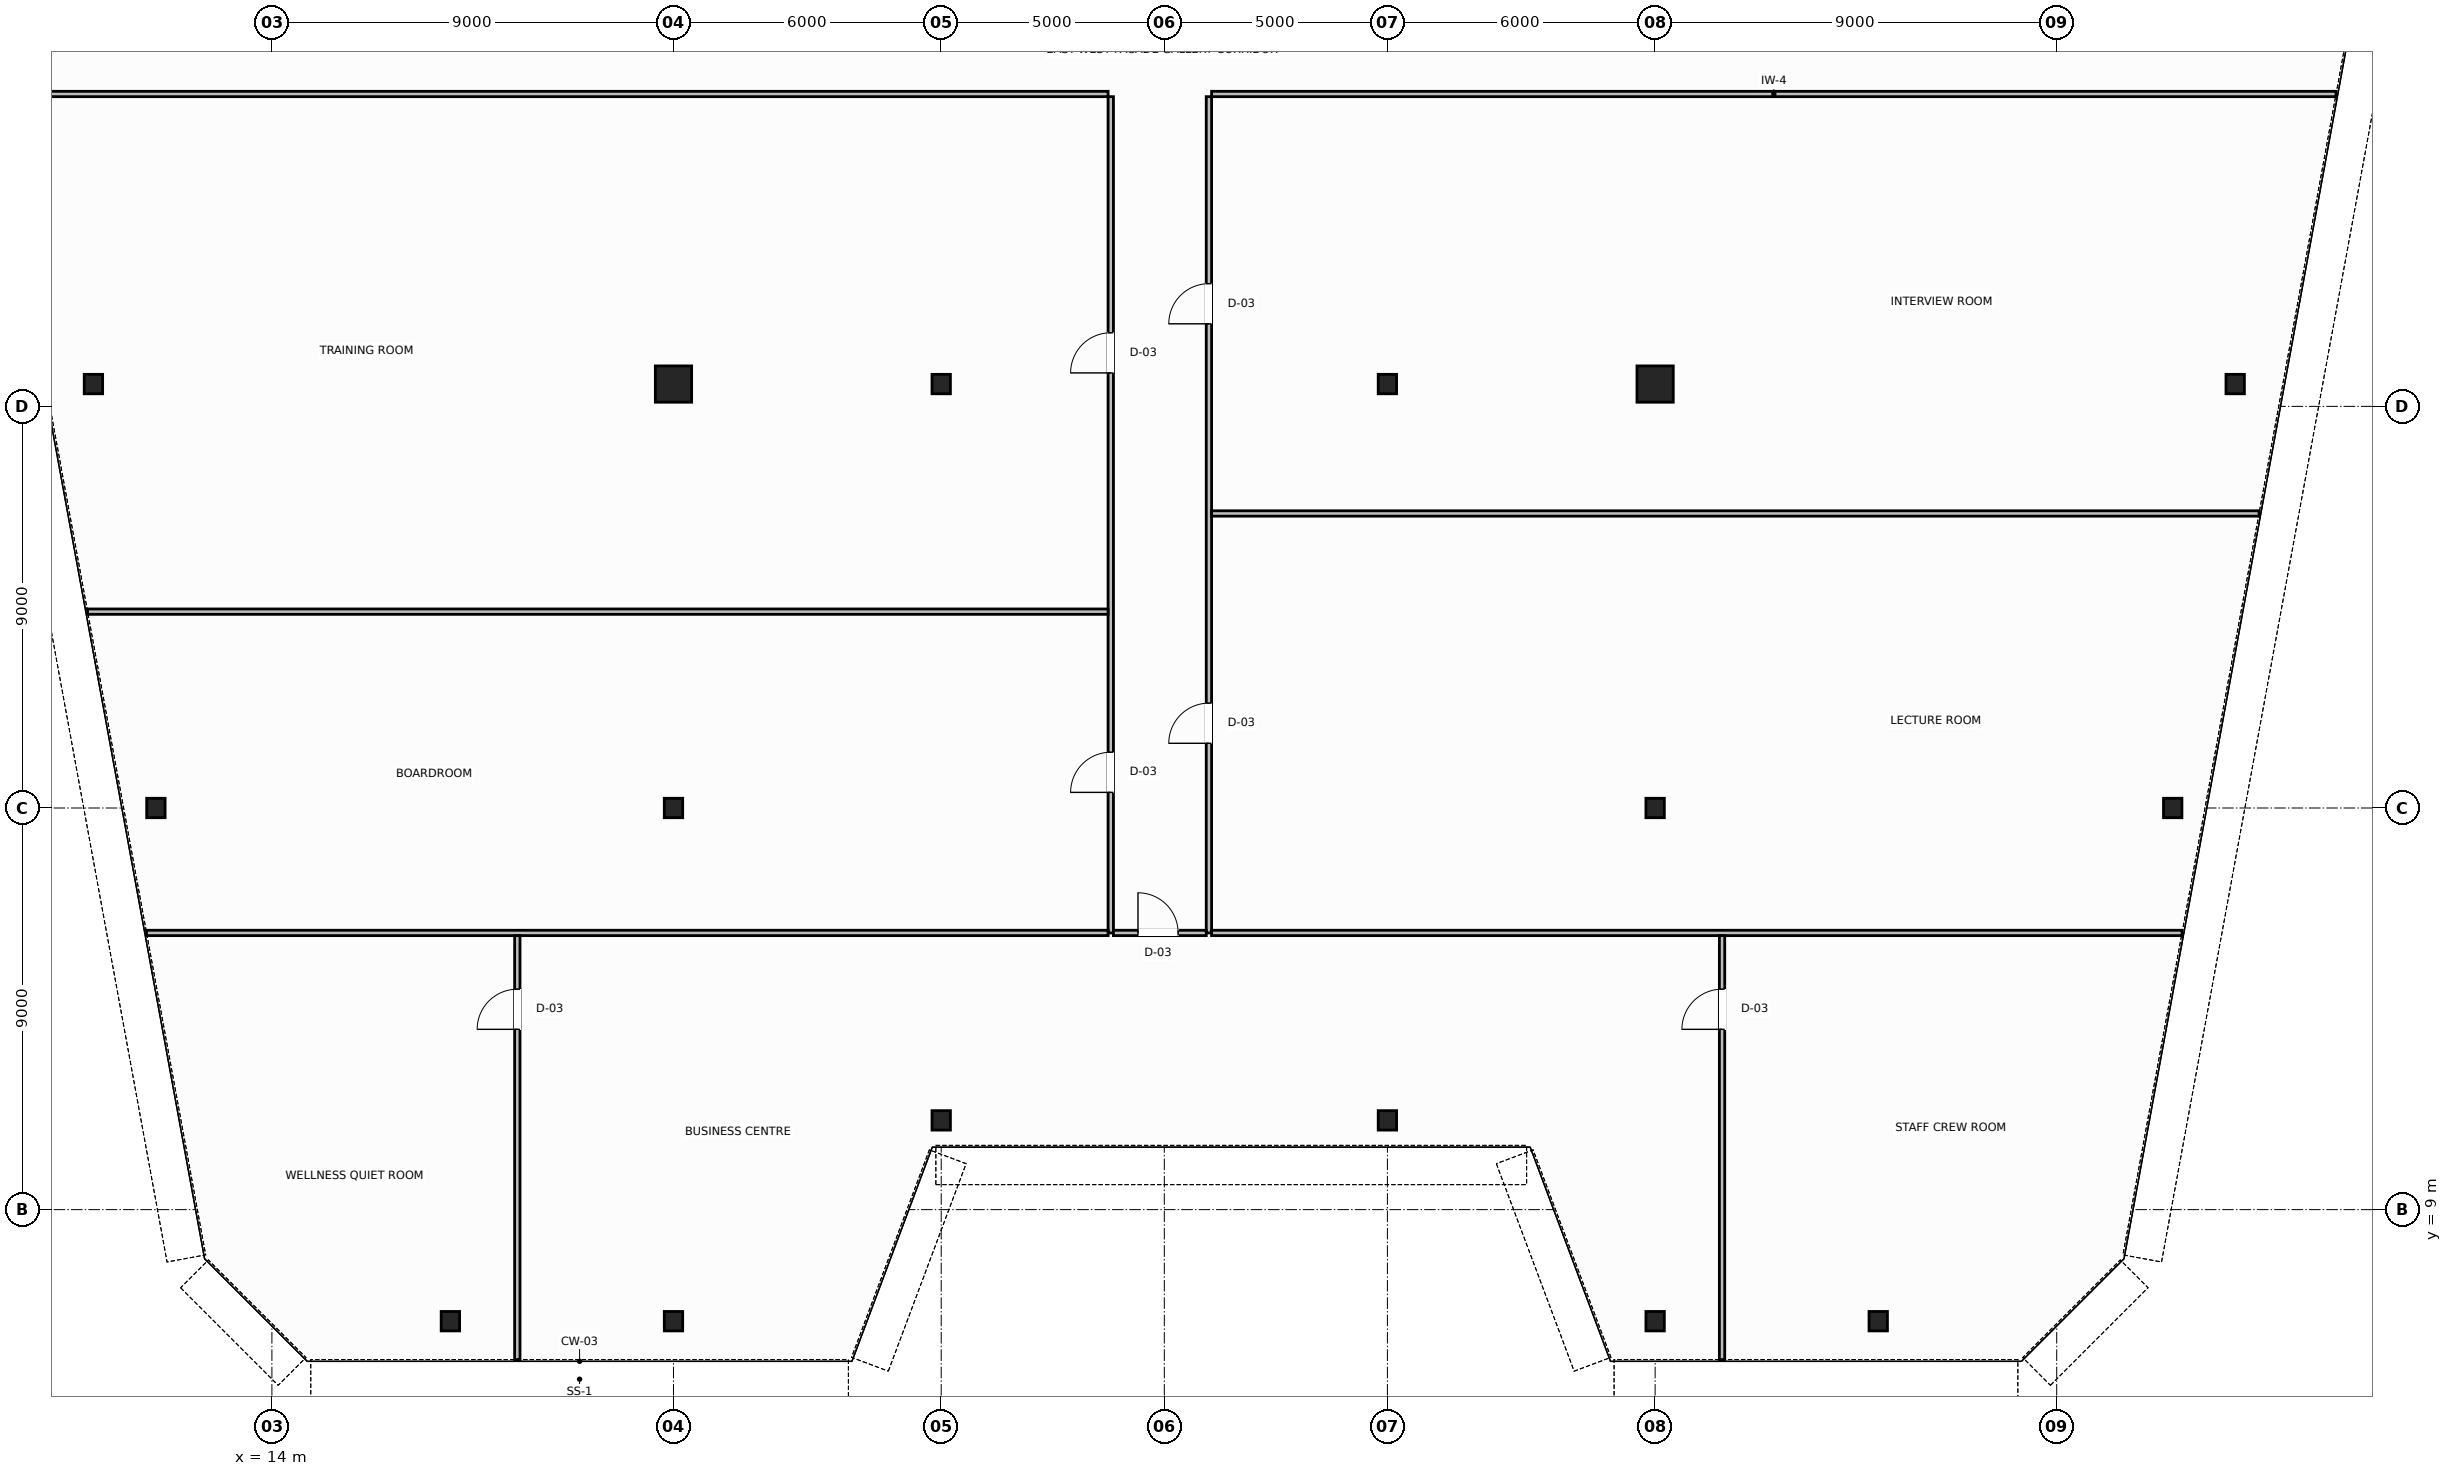
"""IFC4 building model, lengths in metres.
Left out: names, types, materials, properties, quantities, classifications, styles, units other than length and angle.
Written with IfcOpenShell. Run it as: python <this file> out.ifc"""

import sys

from ifc_helpers import new_model, si_unit, direction, frame, frame_2d, origin, origin_2d, place, context, subcontext, project, spatial, rectangle, hollow_circle, i_section, extrude, source, transform, mapped, element, fill, save


model = new_model("IFC4")
c1 = context("Model", 3, precision=1e-05, world=origin(), true_north=direction((0.0, 1.0)))
c2 = subcontext(c1, "Body", "Model", "MODEL_VIEW")
j1 = project(units=[si_unit("LENGTHUNIT", "METRE"), si_unit("PLANEANGLEUNIT", "RADIAN")], contexts=[c1])
p1 = place(None, origin())
s1 = spatial("IfcSite", under=j1, at=p1, CompositionType="ELEMENT")
p2 = place(p1, origin())
s2 = spatial("IfcBuilding", under=s1, at=p2, CompositionType="ELEMENT")
p3 = place(p2, frame((0.0, 0.0, 191.8)))
s3 = spatial("IfcBuildingStorey", under=s2, at=p3, CompositionType="ELEMENT", Elevation=191.8)
m1 = source(origin(), c2, "Body", "SweptSolid", [
    extrude(i_section(OverallWidth=0.412, OverallDepth=0.435, WebThickness=0.036, FlangeThickness=0.05, FilletRadius=0.015, at=origin_2d()), origin(), (0.0, 0.0, 1.0), 3.8),
])
for number, where, z_axis, x_axis in (
    (1, (10.0, 27.5, 0.0), (0.0, 0.0, 1.0), (1.0, 0.0, 0.0)),
    (2, (11.4, 18.0, 0.0), (0.0, 0.0, 1.0), (1.0, 0.0, 0.0)),
    (3, (58.0, 27.5, 0.0), (0.0, 0.0, 1.0), (1.0, 0.0, 0.0)),
    (4, (56.6, 18.0, 0.0), (0.0, 0.0, 1.0), (1.0, 0.0, 0.0)),
):
    element("IfcColumn", number, at=place(p3, frame(where, z_axis=z_axis, x_axis=x_axis)), inside=s3, PredefinedType="COLUMN", context=c2, shape_type="MappedRepresentation", body=[
        mapped(m1, transform((0.0, 0.0, 0.0), scale=1.0)),
    ])
m2 = source(origin(), c2, "Body", "SweptSolid", [
    extrude(hollow_circle(Radius=0.406, WallThickness=0.04, at=origin_2d()), origin(), (0.0, 0.0, 1.0), 3.8),
])
p4 = place(p3, frame((23.0, 27.5, 0.0), z_axis=(0.0, 0.0, 1.0), x_axis=(1.0, 0.0, 0.0)))
e5 = element("IfcColumn", 5, at=p4, inside=s3, PredefinedType="COLUMN", context=c2, shape_type="MappedRepresentation", body=[
    mapped(m2, transform((0.0, 0.0, 0.0), scale=1.0)),
])
m3 = source(origin(), c2, "Body", "SweptSolid", [
    extrude(i_section(OverallWidth=0.412, OverallDepth=0.435, WebThickness=0.036, FlangeThickness=0.05, FilletRadius=0.015, at=origin_2d()), origin(), (0.0, 0.0, 1.0), 3.8),
])
for number, where, z_axis, x_axis in (
    (6, (29.0, 27.5, 0.0), (0.0, 0.0, 1.0), (1.0, 0.0, 0.0)),
    (7, (39.0, 27.5, 0.0), (0.0, 0.0, 1.0), (1.0, 0.0, 0.0)),
):
    element("IfcColumn", number, at=place(p3, frame(where, z_axis=z_axis, x_axis=x_axis)), inside=s3, PredefinedType="COLUMN", context=c2, shape_type="MappedRepresentation", body=[
        mapped(m3, transform((0.0, 0.0, 0.0), scale=1.0)),
    ])
p5 = place(p3, frame((45.0, 27.5, 0.0), z_axis=(0.0, 0.0, 1.0), x_axis=(1.0, 0.0, 0.0)))
e8 = element("IfcColumn", 8, at=p5, inside=s3, PredefinedType="COLUMN", context=c2, shape_type="MappedRepresentation", body=[
    mapped(m2, transform((0.0, 0.0, 0.0), scale=1.0)),
])
for number, where, z_axis, x_axis in (
    (9, (23.0, 18.0, 0.0), (0.0, 0.0, 1.0), (1.0, 0.0, 0.0)),
    (10, (45.0, 18.0, 0.0), (0.0, 0.0, 1.0), (1.0, 0.0, 0.0)),
    (11, (18.0, 6.5, 0.0), (0.0, 0.0, 1.0), (1.0, 0.0, 0.0)),
    (12, (23.0, 6.5, 0.0), (0.0, 0.0, 1.0), (1.0, 0.0, 0.0)),
    (13, (29.0, 11.0, 0.0), (0.0, 0.0, 1.0), (1.0, 0.0, 0.0)),
    (14, (39.0, 11.0, 0.0), (0.0, 0.0, 1.0), (1.0, 0.0, 0.0)),
    (15, (45.0, 6.5, 0.0), (0.0, 0.0, 1.0), (1.0, 0.0, 0.0)),
    (16, (50.0, 6.5, 0.0), (0.0, 0.0, 1.0), (1.0, 0.0, 0.0)),
):
    element("IfcColumn", number, at=place(p3, frame(where, z_axis=z_axis, x_axis=x_axis)), inside=s3, PredefinedType="COLUMN", context=c2, shape_type="MappedRepresentation", body=[
        mapped(m3, transform((0.0, 0.0, 0.0), scale=1.0)),
    ])
p6 = place(p3, frame((7.739, 34.0, 0.0), z_axis=(0.0, 0.0, 1.0), x_axis=(1.0, 0.0, 0.0)))
e17 = element("IfcWall", 17, at=p6, inside=s3, PredefinedType="PARTITIONING", context=c2, shape_type="SweptSolid", body=[
    extrude(rectangle(XDim=25.001, YDim=0.12, at=frame_2d((12.5, 0.0))), origin(), (0.0, 0.0, 1.0), 3.58),
])
p7 = place(p3, frame((35.06, 34.0, 0.0), z_axis=(0.0, 0.0, 1.0), x_axis=(1.0, 0.0, 0.0)))
e18 = element("IfcWall", 18, at=p7, inside=s3, PredefinedType="PARTITIONING", context=c2, shape_type="SweptSolid", body=[
    extrude(rectangle(XDim=25.201, YDim=0.12, at=frame_2d((12.601, 0.0))), origin(), (0.0, 0.0, 1.0), 3.58),
])
p8 = place(p3, frame((32.8, 15.2, 0.0), z_axis=(0.0, 0.0, 1.0), x_axis=(0.0, 1.0, 0.0)))
e19 = element("IfcWall", 19, at=p8, inside=s3, PredefinedType="PARTITIONING", context=c2, shape_type="SweptSolid", body=[
    extrude(rectangle(XDim=18.74, YDim=0.12, at=frame_2d((9.37, 0.0))), origin(), (0.0, 0.0, 1.0), 3.58),
])
p9 = place(p8, frame((3.15, 0.0, 0.0)))
e20 = element("IfcOpeningElement", 20, at=p9, cuts=e19, PredefinedType="OPENING", context=c2, shape_type="SweptSolid", body=[
    extrude(rectangle(XDim=0.9, YDim=2.15, at=frame_2d((0.45, 1.075))), frame((0.0, 0.07, 0.0), z_axis=(0.0, -1.0, 0.0), x_axis=(1.0, 0.0, 0.0)), (0.0, 0.0, 1.0), 0.14),
])
p10 = place(p8, frame((12.55, 0.0, 0.0)))
e21 = element("IfcOpeningElement", 21, at=p10, cuts=e19, PredefinedType="OPENING", context=c2, shape_type="SweptSolid", body=[
    extrude(rectangle(XDim=0.9, YDim=2.15, at=frame_2d((0.45, 1.075))), frame((0.0, 0.07, 0.0), z_axis=(0.0, -1.0, 0.0), x_axis=(1.0, 0.0, 0.0)), (0.0, 0.0, 1.0), 0.14),
])
p11 = place(p3, frame((35.0, 15.2, 0.0), z_axis=(0.0, 0.0, 1.0), x_axis=(0.0, 1.0, 0.0)))
e22 = element("IfcWall", 22, at=p11, inside=s3, PredefinedType="PARTITIONING", context=c2, shape_type="SweptSolid", body=[
    extrude(rectangle(XDim=18.74, YDim=0.12, at=frame_2d((9.37, 0.0))), origin(), (0.0, 0.0, 1.0), 3.58),
])
p12 = place(p11, frame((4.25, 0.0, 0.0)))
e23 = element("IfcOpeningElement", 23, at=p12, cuts=e22, PredefinedType="OPENING", context=c2, shape_type="SweptSolid", body=[
    extrude(rectangle(XDim=0.9, YDim=2.15, at=frame_2d((0.45, 1.075))), frame((0.0, 0.07, 0.0), z_axis=(0.0, -1.0, 0.0), x_axis=(1.0, 0.0, 0.0)), (0.0, 0.0, 1.0), 0.14),
])
p13 = place(p11, frame((13.65, 0.0, 0.0)))
e24 = element("IfcOpeningElement", 24, at=p13, cuts=e22, PredefinedType="OPENING", context=c2, shape_type="SweptSolid", body=[
    extrude(rectangle(XDim=0.9, YDim=2.15, at=frame_2d((0.45, 1.075))), frame((0.0, 0.07, 0.0), z_axis=(0.0, -1.0, 0.0), x_axis=(1.0, 0.0, 0.0)), (0.0, 0.0, 1.0), 0.14),
])
p14 = place(p3, frame((32.86, 15.2, 0.0), z_axis=(0.0, 0.0, 1.0), x_axis=(1.0, 0.0, 0.0)))
e25 = element("IfcWall", 25, at=p14, inside=s3, PredefinedType="PARTITIONING", context=c2, shape_type="SweptSolid", body=[
    extrude(rectangle(XDim=2.08, YDim=0.12, at=frame_2d((1.04, 0.0))), origin(), (0.0, 0.0, 1.0), 3.58),
])
p15 = place(p14, frame((0.55, 0.0, 0.0)))
e26 = element("IfcOpeningElement", 26, at=p15, cuts=e25, PredefinedType="OPENING", context=c2, shape_type="SweptSolid", body=[
    extrude(rectangle(XDim=0.9, YDim=2.15, at=frame_2d((0.45, 1.075))), frame((0.0, 0.07, 0.0), z_axis=(0.0, -1.0, 0.0), x_axis=(1.0, 0.0, 0.0)), (0.0, 0.0, 1.0), 0.14),
])
p16 = place(p3, frame((11.191, 15.2, 0.0), z_axis=(0.0, 0.0, 1.0), x_axis=(1.0, 0.0, 0.0)))
e27 = element("IfcWall", 27, at=p16, inside=s3, PredefinedType="PARTITIONING", context=c2, shape_type="SweptSolid", body=[
    extrude(rectangle(XDim=21.549, YDim=0.12, at=frame_2d((10.775, 0.0))), origin(), (0.0, 0.0, 1.0), 3.58),
])
p17 = place(p3, frame((35.06, 15.2, 0.0), z_axis=(0.0, 0.0, 1.0), x_axis=(1.0, 0.0, 0.0)))
e28 = element("IfcWall", 28, at=p17, inside=s3, PredefinedType="PARTITIONING", context=c2, shape_type="SweptSolid", body=[
    extrude(rectangle(XDim=21.749, YDim=0.12, at=frame_2d((10.875, 0.0))), origin(), (0.0, 0.0, 1.0), 3.58),
])
p18 = place(p3, frame((19.5, 5.64, 0.0), z_axis=(0.0, 0.0, 1.0), x_axis=(0.0, 1.0, 0.0)))
e29 = element("IfcWall", 29, at=p18, inside=s3, PredefinedType="PARTITIONING", context=c2, shape_type="SweptSolid", body=[
    extrude(rectangle(XDim=9.5, YDim=0.12, at=frame_2d((4.75, 0.0))), origin(), (0.0, 0.0, 1.0), 3.58),
])
p19 = place(p18, frame((7.4, 0.0, 0.0)))
e30 = element("IfcOpeningElement", 30, at=p19, cuts=e29, PredefinedType="OPENING", context=c2, shape_type="SweptSolid", body=[
    extrude(rectangle(XDim=0.9, YDim=2.15, at=frame_2d((0.45, 1.075))), frame((0.0, 0.07, 0.0), z_axis=(0.0, -1.0, 0.0), x_axis=(1.0, 0.0, 0.0)), (0.0, 0.0, 1.0), 0.14),
])
p20 = place(p3, frame((46.5, 5.64, 0.0), z_axis=(0.0, 0.0, 1.0), x_axis=(0.0, 1.0, 0.0)))
e31 = element("IfcWall", 31, at=p20, inside=s3, PredefinedType="PARTITIONING", context=c2, shape_type="SweptSolid", body=[
    extrude(rectangle(XDim=9.5, YDim=0.12, at=frame_2d((4.75, 0.0))), origin(), (0.0, 0.0, 1.0), 3.58),
])
p21 = place(p20, frame((7.4, 0.0, 0.0)))
e32 = element("IfcOpeningElement", 32, at=p21, cuts=e31, PredefinedType="OPENING", context=c2, shape_type="SweptSolid", body=[
    extrude(rectangle(XDim=0.9, YDim=2.15, at=frame_2d((0.45, 1.075))), frame((0.0, 0.07, 0.0), z_axis=(0.0, -1.0, 0.0), x_axis=(1.0, 0.0, 0.0)), (0.0, 0.0, 1.0), 0.14),
])
p22 = place(p3, frame((9.869, 22.4, 0.0), z_axis=(0.0, 0.0, 1.0), x_axis=(1.0, 0.0, 0.0)))
e33 = element("IfcWall", 33, at=p22, inside=s3, PredefinedType="PARTITIONING", context=c2, shape_type="SweptSolid", body=[
    extrude(rectangle(XDim=22.871, YDim=0.12, at=frame_2d((11.436, 0.0))), origin(), (0.0, 0.0, 1.0), 3.58),
])
p23 = place(p3, frame((35.06, 24.6, 0.0), z_axis=(0.0, 0.0, 1.0), x_axis=(1.0, 0.0, 0.0)))
e34 = element("IfcWall", 34, at=p23, inside=s3, PredefinedType="PARTITIONING", context=c2, shape_type="SweptSolid", body=[
    extrude(rectangle(XDim=23.475, YDim=0.12, at=frame_2d((11.738, 0.0))), origin(), (0.0, 0.0, 1.0), 3.58),
])
m4 = source(origin(), c2, "Body", "SweptSolid", [
    extrude(rectangle(XDim=0.9, YDim=2.15, at=frame_2d((0.45, 1.075))), frame((0.0, 0.025, 0.0), z_axis=(0.0, -1.0, 0.0), x_axis=(1.0, 0.0, 0.0)), (0.0, 0.0, 1.0), 0.05),
])
p24 = place(p19, origin())
e35 = element("IfcDoor", 35, at=p24, inside=s3, OperationType="SINGLE_SWING_RIGHT", PredefinedType="DOOR", context=c2, shape_type="MappedRepresentation", body=[
    mapped(m4, transform((0.0, 0.0, 0.0), scale=1.0)),
])
fill(e30, e35)
p25 = place(p15, origin())
e36 = element("IfcDoor", 36, at=p25, inside=s3, OperationType="SINGLE_SWING_LEFT", PredefinedType="DOOR", context=c2, shape_type="MappedRepresentation", body=[
    mapped(m4, transform((0.0, 0.0, 0.0), scale=1.0)),
])
fill(e26, e36)
p26 = place(p21, origin())
e37 = element("IfcDoor", 37, at=p26, inside=s3, OperationType="SINGLE_SWING_LEFT", PredefinedType="DOOR", context=c2, shape_type="MappedRepresentation", body=[
    mapped(m4, transform((0.0, 0.0, 0.0), scale=1.0)),
])
fill(e32, e37)
p27 = place(p9, origin())
e38 = element("IfcDoor", 38, at=p27, inside=s3, OperationType="SINGLE_SWING_LEFT", PredefinedType="DOOR", context=c2, shape_type="MappedRepresentation", body=[
    mapped(m4, transform((0.0, 0.0, 0.0), scale=1.0)),
])
fill(e20, e38)
p28 = place(p10, origin())
e39 = element("IfcDoor", 39, at=p28, inside=s3, OperationType="SINGLE_SWING_RIGHT", PredefinedType="DOOR", context=c2, shape_type="MappedRepresentation", body=[
    mapped(m4, transform((0.0, 0.0, 0.0), scale=1.0)),
])
fill(e21, e39)
p29 = place(p12, origin())
e40 = element("IfcDoor", 40, at=p29, inside=s3, OperationType="SINGLE_SWING_RIGHT", PredefinedType="DOOR", context=c2, shape_type="MappedRepresentation", body=[
    mapped(m4, transform((0.0, 0.0, 0.0), scale=1.0)),
])
fill(e23, e40)
p30 = place(p13, origin())
e41 = element("IfcDoor", 41, at=p30, inside=s3, OperationType="SINGLE_SWING_LEFT", PredefinedType="DOOR", context=c2, shape_type="MappedRepresentation", body=[
    mapped(m4, transform((0.0, 0.0, 0.0), scale=1.0)),
])
fill(e24, e41)
save(model, sys.argv[1])
